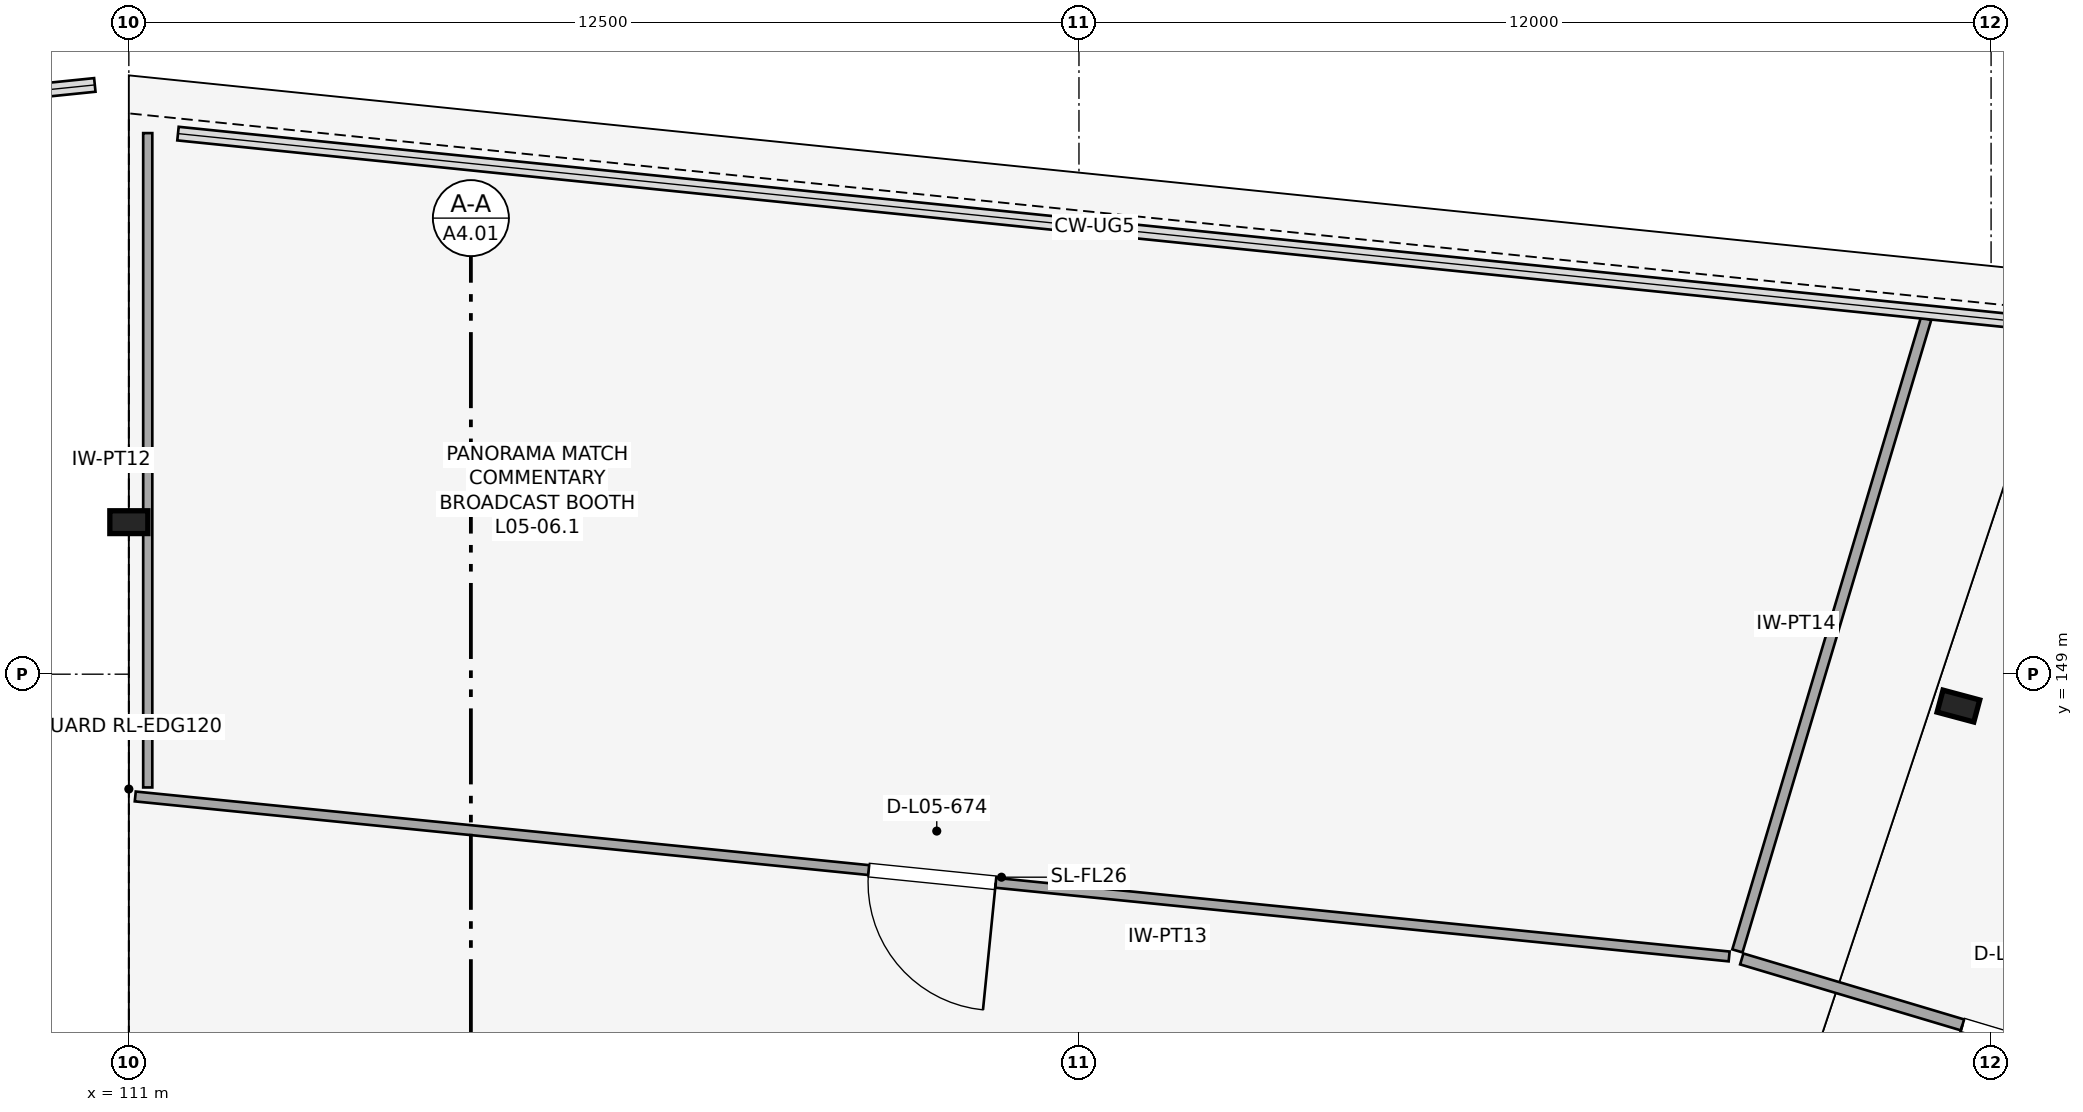
"""IFC4 building model, lengths in metres.
Left out: names, types, materials, properties, quantities, classifications, styles, units other than length and angle.
Written with IfcOpenShell. Run it as: python <this file> out.ifc"""

import sys

from ifc_helpers import new_model, si_unit, direction, frame, frame_2d, origin, origin_2d, place, context, subcontext, project, spatial, rectangle, i_section, extrude, element, fill, save


model = new_model("IFC4")
c1 = context("Model", 3, precision=1e-05, world=origin(), true_north=direction((0.0, 1.0)))
c2 = subcontext(c1, "Body", "Model", "MODEL_VIEW")
j1 = project(units=[si_unit("LENGTHUNIT", "METRE"), si_unit("PLANEANGLEUNIT", "RADIAN")], contexts=[c1])
p1 = place(None, origin())
s1 = spatial("IfcSite", under=j1, at=p1, CompositionType="ELEMENT")
p2 = place(p1, origin())
s2 = spatial("IfcBuilding", under=s1, at=p2, CompositionType="ELEMENT")
p3 = place(p2, frame((0.0, 0.0, 26.2)))
s3 = spatial("IfcBuildingStorey", under=s2, at=p3, CompositionType="ELEMENT", Elevation=26.2)
for number, where, z_axis, x_axis in (
    (1, (135.07, 148.581, 0.0), (0.0, 0.0, 1.0), (0.259, 0.966, 0.0)),
    (2, (111.0, 151.0, 0.0), (0.0, 0.0, 1.0), (0.0, 1.0, 0.0)),
):
    element("IfcColumn", number, at=place(p3, frame(where, z_axis=z_axis, x_axis=x_axis)), inside=s3, PredefinedType="COLUMN", context=c2, shape_type="SweptSolid", body=[
        extrude(i_section(OverallWidth=0.3, OverallDepth=0.5, WebThickness=0.014, FlangeThickness=0.028, FilletRadius=0.027, at=origin_2d()), origin(), (0.0, 0.0, 1.0), 5.6),
    ])
p4 = place(p3, frame((139.312, 143.135, 0.0), z_axis=(0.0, 0.0, 1.0), x_axis=(-0.958149765672, 0.286267403913, 0.0)))
e3 = element("IfcWall", 3, at=p4, inside=s3, PredefinedType="PARTITIONING", context=c2, shape_type="SweptSolid", body=[
    extrude(rectangle(XDim=7.402, YDim=0.15, at=frame_2d((3.701, 0.0))), origin(), (0.0, 0.0, 1.0), 4.1),
])
p5 = place(p4, frame((3.031, 0.0, 0.0)))
e4 = element("IfcOpeningElement", 4, at=p5, cuts=e3, PredefinedType="OPENING", context=c2, shape_type="SweptSolid", body=[
    extrude(rectangle(XDim=1.34, YDim=2.24, at=frame_2d((0.67, 1.12))), frame((0.0, 0.085, 0.0), z_axis=(0.0, -1.0, 0.0), x_axis=(1.0, 0.0, 0.0)), (0.0, 0.0, 1.0), 0.17),
])
p6 = place(p3, frame((132.163, 145.36, 0.0), z_axis=(0.0, 0.0, 1.0), x_axis=(0.285967312816, 0.958239373017, 0.0)))
e5 = element("IfcWall", 5, at=p6, inside=s3, PredefinedType="PARTITIONING", context=c2, shape_type="SweptSolid", body=[
    extrude(rectangle(XDim=8.682, YDim=0.14, at=frame_2d((4.341, 0.0))), origin(), (0.0, 0.0, 1.0), 4.1),
])
p7 = place(p3, frame((132.054, 145.287, 0.0), z_axis=(0.0, 0.0, 1.0), x_axis=(-0.994999152048, 0.099883369104, 0.0)))
e6 = element("IfcWall", 6, at=p7, inside=s3, PredefinedType="PARTITIONING", context=c2, shape_type="SweptSolid", body=[
    extrude(rectangle(XDim=21.074, YDim=0.13, at=frame_2d((10.537, 0.0))), origin(), (0.0, 0.0, 1.0), 4.1),
])
p8 = place(p7, frame((9.697, 0.0, 0.0)))
e7 = element("IfcOpeningElement", 7, at=p8, cuts=e6, PredefinedType="OPENING", context=c2, shape_type="SweptSolid", body=[
    extrude(rectangle(XDim=1.68, YDim=2.24, at=frame_2d((0.84, 1.12))), frame((0.0, 0.075, 0.0), z_axis=(0.0, -1.0, 0.0), x_axis=(1.0, 0.0, 0.0)), (0.0, 0.0, 1.0), 0.15),
])
p9 = place(p3, frame((111.249, 147.51, 0.0), z_axis=(0.0, 0.0, 1.0), x_axis=(0.0, 1.0, 0.0)))
e8 = element("IfcWall", 8, at=p9, inside=s3, PredefinedType="PARTITIONING", context=c2, shape_type="SweptSolid", body=[
    extrude(rectangle(XDim=8.608, YDim=0.12, at=frame_2d((4.304, 0.0))), origin(), (0.0, 0.0, 1.0), 4.1),
])
p10 = place(p5, origin())
e9 = element("IfcDoor", 9, at=p10, inside=s3, OperationType="SINGLE_SWING_RIGHT", PredefinedType="DOOR", context=c2, shape_type="SweptSolid", body=[
    extrude(rectangle(XDim=1.34, YDim=2.24, at=frame_2d((0.67, 1.12))), frame((0.0, 0.025, 0.0), z_axis=(0.0, -1.0, 0.0), x_axis=(1.0, 0.0, 0.0)), (0.0, 0.0, 1.0), 0.05),
])
fill(e4, e9)
p11 = place(p8, origin())
e10 = element("IfcDoor", 10, at=p11, inside=s3, OperationType="SINGLE_SWING_LEFT", PredefinedType="DOOR", context=c2, shape_type="SweptSolid", body=[
    extrude(rectangle(XDim=1.68, YDim=2.24, at=frame_2d((0.84, 1.12))), frame((0.0, 0.025, 0.0), z_axis=(0.0, -1.0, 0.0), x_axis=(1.0, 0.0, 0.0)), (0.0, 0.0, 1.0), 0.05),
])
fill(e7, e10)
save(model, sys.argv[1])
